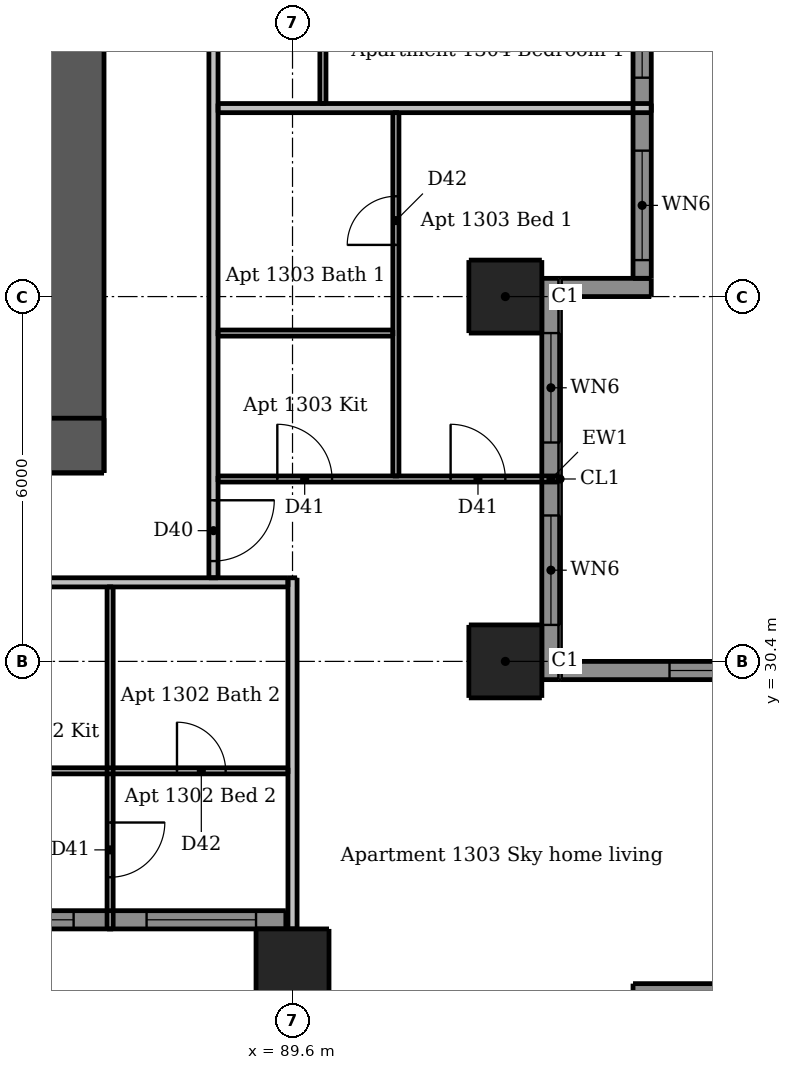
"""IFC4 building model, lengths in metres.
Left out: names, types, materials, properties, quantities, classifications, styles, units other than length and angle.
Written with IfcOpenShell. Run it as: python <this file> out.ifc"""

import sys

from ifc_helpers import new_model, si_unit, direction, frame, frame_2d, origin, origin_2d, place, context, subcontext, project, spatial, rectangle, extrude, element, fill, save


model = new_model("IFC4")
c1 = context("Model", 3, precision=1e-05, world=origin(), true_north=direction((0.0, 1.0)))
c2 = subcontext(c1, "Body", "Model", "MODEL_VIEW")
j1 = project(units=[si_unit("LENGTHUNIT", "METRE"), si_unit("PLANEANGLEUNIT", "RADIAN")], contexts=[c1])
p1 = place(None, origin())
s1 = spatial("IfcSite", under=j1, at=p1, CompositionType="ELEMENT")
p2 = place(p1, origin())
s2 = spatial("IfcBuilding", under=s1, at=p2, CompositionType="ELEMENT")
p3 = place(p2, frame((0.0, 0.0, 49.9)))
s3 = spatial("IfcBuildingStorey", under=s2, at=p3, CompositionType="ELEMENT", Elevation=49.9)
p4 = place(p3, frame((62.5, 33.95, 0.0), z_axis=(0.0, 0.0, 1.0), x_axis=(1.0, 0.0, 0.0)))
e1 = element("IfcWall", 1, at=p4, inside=s3, PredefinedType="SHEAR", context=c2, shape_type="SweptSolid", body=[
    extrude(rectangle(XDim=24.0, YDim=0.9, at=frame_2d((12.0, 0.0))), origin(), (0.0, 0.0, 1.0), 3.05),
])
p5 = place(p4, frame((2.05, 0.0, 0.0)))
e2 = element("IfcOpeningElement", 2, at=p5, cuts=e1, PredefinedType="OPENING", context=c2, shape_type="SweptSolid", body=[
    extrude(rectangle(XDim=1.1, YDim=2.1, at=frame_2d((0.55, 1.05))), frame((0.0, 0.46, 0.0), z_axis=(0.0, -1.0, 0.0), x_axis=(1.0, 0.0, 0.0)), (0.0, 0.0, 1.0), 0.92),
])
p6 = place(p4, frame((20.85, 0.0, 0.0)))
e3 = element("IfcOpeningElement", 3, at=p6, cuts=e1, PredefinedType="OPENING", context=c2, shape_type="SweptSolid", body=[
    extrude(rectangle(XDim=1.1, YDim=2.1, at=frame_2d((0.55, 1.05))), frame((0.0, 0.46, 0.0), z_axis=(0.0, -1.0, 0.0), x_axis=(1.0, 0.0, 0.0)), (0.0, 0.0, 1.0), 0.92),
])
p7 = place(p4, frame((8.0, 0.0, 0.0)))
e4 = element("IfcOpeningElement", 4, at=p7, cuts=e1, PredefinedType="OPENING", context=c2, shape_type="SweptSolid", body=[
    extrude(rectangle(XDim=1.1, YDim=2.1, at=frame_2d((0.55, 1.05))), frame((0.0, 0.46, 0.0), z_axis=(0.0, -1.0, 0.0), x_axis=(1.0, 0.0, 0.0)), (0.0, 0.0, 1.0), 0.92),
])
p8 = place(p4, frame((17.488, 0.0, 0.0)))
e5 = element("IfcOpeningElement", 5, at=p8, cuts=e1, PredefinedType="OPENING", context=c2, shape_type="SweptSolid", body=[
    extrude(rectangle(XDim=0.9, YDim=2.1, at=frame_2d((0.45, 1.05))), frame((0.0, 0.46, 0.0), z_axis=(0.0, -1.0, 0.0), x_axis=(1.0, 0.0, 0.0)), (0.0, 0.0, 1.0), 0.92),
])
p9 = place(p3, frame((86.05, 33.5, 0.0), z_axis=(0.0, 0.0, 1.0), x_axis=(0.0, 1.0, 0.0)))
e6 = element("IfcWall", 6, at=p9, inside=s3, PredefinedType="SHEAR", context=c2, shape_type="SweptSolid", body=[
    extrude(rectangle(XDim=24.0, YDim=0.9, at=frame_2d((12.0, 0.0))), origin(), (0.0, 0.0, 1.0), 3.05),
])
p10 = place(p9, frame((11.2, 0.0, 0.0)))
e7 = element("IfcOpeningElement", 7, at=p10, cuts=e6, PredefinedType="OPENING", context=c2, shape_type="SweptSolid", body=[
    extrude(rectangle(XDim=1.6, YDim=2.1, at=frame_2d((0.8, 1.05))), frame((0.0, 0.46, 0.0), z_axis=(0.0, -1.0, 0.0), x_axis=(1.0, 0.0, 0.0)), (0.0, 0.0, 1.0), 0.92),
])
for number, where, z_axis, x_axis in (
    (8, (89.6, 25.4, 0.0), (0.0, 0.0, 1.0), (1.0, 0.0, 0.0)),
    (9, (93.1, 30.4, 0.0), (0.0, 0.0, 1.0), (1.0, 0.0, 0.0)),
    (10, (93.1, 36.4, 0.0), (0.0, 0.0, 1.0), (1.0, 0.0, 0.0)),
):
    element("IfcColumn", number, at=place(p3, frame(where, z_axis=z_axis, x_axis=x_axis)), inside=s3, PredefinedType="COLUMN", context=c2, shape_type="SweptSolid", body=[
        extrude(rectangle(XDim=1.2, YDim=1.2, at=origin_2d()), origin(), (0.0, 0.0, 1.0), 3.05),
    ])
p11 = place(p3, frame((95.2, 24.95, 0.0), z_axis=(0.0, 0.0, 1.0), x_axis=(1.0, 0.0, 0.0)))
e11 = element("IfcWall", 11, at=p11, inside=s3, PredefinedType="SOLIDWALL", context=c2, shape_type="SweptSolid", body=[
    extrude(rectangle(XDim=4.8, YDim=0.3, at=frame_2d((2.4, 0.0))), origin(), (0.0, 0.0, 1.0), 3.05),
])
p12 = place(p3, frame((100.0, 30.25, 0.0), z_axis=(0.0, 0.0, 1.0), x_axis=(-1.0, 0.0, 0.0)))
e12 = element("IfcWall", 12, at=p12, inside=s3, PredefinedType="SOLIDWALL", context=c2, shape_type="SweptSolid", body=[
    extrude(rectangle(XDim=6.0, YDim=0.3, at=frame_2d((3.0, 0.0))), origin(), (0.0, 0.0, 1.0), 3.05),
])
p13 = place(p12, frame((1.8, 0.0, 0.15)))
e13 = element("IfcOpeningElement", 13, at=p13, cuts=e12, PredefinedType="OPENING", context=c2, shape_type="SweptSolid", body=[
    extrude(rectangle(XDim=2.4, YDim=2.1, at=frame_2d((1.2, 1.05))), frame((0.0, 0.16, 0.0), z_axis=(0.0, -1.0, 0.0), x_axis=(1.0, 0.0, 0.0)), (0.0, 0.0, 1.0), 0.32),
])
p14 = place(p3, frame((94.0, 36.55, 0.0), z_axis=(0.0, 0.0, 1.0), x_axis=(1.0, 0.0, 0.0)))
e14 = element("IfcWall", 14, at=p14, inside=s3, PredefinedType="SOLIDWALL", context=c2, shape_type="SweptSolid", body=[
    extrude(rectangle(XDim=1.5, YDim=0.3, at=frame_2d((0.75, 0.0))), origin(), (0.0, 0.0, 1.0), 3.05),
])
p15 = place(p3, frame((83.6, 26.15, 0.0), z_axis=(0.0, 0.0, 1.0), x_axis=(1.0, 0.0, 0.0)))
e15 = element("IfcWall", 15, at=p15, inside=s3, PredefinedType="SOLIDWALL", context=c2, shape_type="SweptSolid", body=[
    extrude(rectangle(XDim=5.89, YDim=0.3, at=frame_2d((2.945, 0.0))), origin(), (0.0, 0.0, 1.0), 3.05),
])
p16 = place(p15, frame((0.6, 0.0, 0.15)))
e16 = element("IfcOpeningElement", 16, at=p16, cuts=e15, PredefinedType="OPENING", context=c2, shape_type="SweptSolid", body=[
    extrude(rectangle(XDim=1.8, YDim=2.1, at=frame_2d((0.9, 1.05))), frame((0.0, 0.16, 0.0), z_axis=(0.0, -1.0, 0.0), x_axis=(1.0, 0.0, 0.0)), (0.0, 0.0, 1.0), 0.32),
])
p17 = place(p15, frame((3.6, 0.0, 0.15)))
e17 = element("IfcOpeningElement", 17, at=p17, cuts=e15, PredefinedType="OPENING", context=c2, shape_type="SweptSolid", body=[
    extrude(rectangle(XDim=1.8, YDim=2.1, at=frame_2d((0.9, 1.05))), frame((0.0, 0.16, 0.0), z_axis=(0.0, -1.0, 0.0), x_axis=(1.0, 0.0, 0.0)), (0.0, 0.0, 1.0), 0.32),
])
p18 = place(p3, frame((93.85, 30.1, 0.0), z_axis=(0.0, 0.0, 1.0), x_axis=(0.0, 1.0, 0.0)))
e18 = element("IfcWall", 18, at=p18, inside=s3, PredefinedType="SOLIDWALL", context=c2, shape_type="SweptSolid", body=[
    extrude(rectangle(XDim=6.6, YDim=0.3, at=frame_2d((3.3, 0.0))), origin(), (0.0, 0.0, 1.0), 3.05),
])
p19 = place(p18, frame((0.9, 0.0, 0.15)))
e19 = element("IfcOpeningElement", 19, at=p19, cuts=e18, PredefinedType="OPENING", context=c2, shape_type="SweptSolid", body=[
    extrude(rectangle(XDim=1.8, YDim=2.1, at=frame_2d((0.9, 1.05))), frame((0.0, 0.16, 0.0), z_axis=(0.0, -1.0, 0.0), x_axis=(1.0, 0.0, 0.0)), (0.0, 0.0, 1.0), 0.32),
])
p20 = place(p18, frame((3.9, 0.0, 0.15)))
e20 = element("IfcOpeningElement", 20, at=p20, cuts=e18, PredefinedType="OPENING", context=c2, shape_type="SweptSolid", body=[
    extrude(rectangle(XDim=1.8, YDim=2.1, at=frame_2d((0.9, 1.05))), frame((0.0, 0.16, 0.0), z_axis=(0.0, -1.0, 0.0), x_axis=(1.0, 0.0, 0.0)), (0.0, 0.0, 1.0), 0.32),
])
p21 = place(p3, frame((95.35, 36.7, 0.0), z_axis=(0.0, 0.0, 1.0), x_axis=(0.0, 1.0, 0.0)))
e21 = element("IfcWall", 21, at=p21, inside=s3, PredefinedType="SOLIDWALL", context=c2, shape_type="SweptSolid", body=[
    extrude(rectangle(XDim=5.61, YDim=0.3, at=frame_2d((2.805, 0.0))), origin(), (0.0, 0.0, 1.0), 3.05),
])
p22 = place(p21, frame((0.3, 0.0, 0.15)))
e22 = element("IfcOpeningElement", 22, at=p22, cuts=e21, PredefinedType="OPENING", context=c2, shape_type="SweptSolid", body=[
    extrude(rectangle(XDim=1.8, YDim=2.1, at=frame_2d((0.9, 1.05))), frame((0.0, 0.16, 0.0), z_axis=(0.0, -1.0, 0.0), x_axis=(1.0, 0.0, 0.0)), (0.0, 0.0, 1.0), 0.32),
])
p23 = place(p21, frame((3.3, 0.0, 0.15)))
e23 = element("IfcOpeningElement", 23, at=p23, cuts=e21, PredefinedType="OPENING", context=c2, shape_type="SweptSolid", body=[
    extrude(rectangle(XDim=1.8, YDim=2.1, at=frame_2d((0.9, 1.05))), frame((0.0, 0.16, 0.0), z_axis=(0.0, -1.0, 0.0), x_axis=(1.0, 0.0, 0.0)), (0.0, 0.0, 1.0), 0.32),
])
p24 = place(p3, frame((86.6, 31.625, 0.0), z_axis=(0.0, 0.0, 1.0), x_axis=(0.0, -1.0, 0.0)))
e24 = element("IfcWall", 24, at=p24, inside=s3, PredefinedType="PARTITIONING", context=c2, shape_type="SweptSolid", body=[
    extrude(rectangle(XDim=5.625, YDim=0.1, at=frame_2d((2.812, 0.0))), origin(), (0.0, 0.0, 1.0), 3.05),
])
p25 = place(p24, frame((3.875, 0.0, 0.0)))
e25 = element("IfcOpeningElement", 25, at=p25, cuts=e24, PredefinedType="OPENING", context=c2, shape_type="SweptSolid", body=[
    extrude(rectangle(XDim=0.9, YDim=2.1, at=frame_2d((0.45, 1.05))), frame((0.0, 0.06, 0.0), z_axis=(0.0, -1.0, 0.0), x_axis=(1.0, 0.0, 0.0)), (0.0, 0.0, 1.0), 0.12),
])
p26 = place(p3, frame((90.1, 59.35, 0.0), z_axis=(0.0, 0.0, 1.0), x_axis=(0.0, -1.0, 0.0)))
e26 = element("IfcWall", 26, at=p26, inside=s3, PredefinedType="PARTITIONING", context=c2, shape_type="SweptSolid", body=[
    extrude(rectangle(XDim=19.775, YDim=0.1, at=frame_2d((9.888, 0.0))), origin(), (0.0, 0.0, 1.0), 3.05),
])
p27 = place(p26, frame((4.45, 0.0, 0.0)))
e27 = element("IfcOpeningElement", 27, at=p27, cuts=e26, PredefinedType="OPENING", context=c2, shape_type="SweptSolid", body=[
    extrude(rectangle(XDim=0.9, YDim=2.1, at=frame_2d((0.45, 1.05))), frame((0.0, 0.06, 0.0), z_axis=(0.0, -1.0, 0.0), x_axis=(1.0, 0.0, 0.0)), (0.0, 0.0, 1.0), 0.12),
])
p28 = place(p26, frame((0.55, 0.0, 0.0)))
e28 = element("IfcOpeningElement", 28, at=p28, cuts=e26, PredefinedType="OPENING", context=c2, shape_type="SweptSolid", body=[
    extrude(rectangle(XDim=0.9, YDim=2.1, at=frame_2d((0.45, 1.05))), frame((0.0, 0.06, 0.0), z_axis=(0.0, -1.0, 0.0), x_axis=(1.0, 0.0, 0.0)), (0.0, 0.0, 1.0), 0.12),
])
p29 = place(p26, frame((17.6, 0.0, 0.0)))
e29 = element("IfcOpeningElement", 29, at=p29, cuts=e26, PredefinedType="OPENING", context=c2, shape_type="SweptSolid", body=[
    extrude(rectangle(XDim=0.9, YDim=2.1, at=frame_2d((0.45, 1.05))), frame((0.0, 0.06, 0.0), z_axis=(0.0, -1.0, 0.0), x_axis=(1.0, 0.0, 0.0)), (0.0, 0.0, 1.0), 0.12),
])
p30 = place(p26, frame((11.6, 0.0, 0.0)))
e30 = element("IfcOpeningElement", 30, at=p30, cuts=e26, PredefinedType="OPENING", context=c2, shape_type="SweptSolid", body=[
    extrude(rectangle(XDim=0.9, YDim=2.1, at=frame_2d((0.45, 1.05))), frame((0.0, 0.06, 0.0), z_axis=(0.0, -1.0, 0.0), x_axis=(1.0, 0.0, 0.0)), (0.0, 0.0, 1.0), 0.12),
])
p31 = place(p26, frame((14.65, 0.0, 0.0)))
e31 = element("IfcOpeningElement", 31, at=p31, cuts=e26, PredefinedType="OPENING", context=c2, shape_type="SweptSolid", body=[
    extrude(rectangle(XDim=0.8, YDim=2.1, at=frame_2d((0.4, 1.05))), frame((0.0, 0.06, 0.0), z_axis=(0.0, -1.0, 0.0), x_axis=(1.0, 0.0, 0.0)), (0.0, 0.0, 1.0), 0.12),
])
p32 = place(p26, frame((8.65, 0.0, 0.0)))
e32 = element("IfcOpeningElement", 32, at=p32, cuts=e26, PredefinedType="OPENING", context=c2, shape_type="SweptSolid", body=[
    extrude(rectangle(XDim=0.8, YDim=2.1, at=frame_2d((0.4, 1.05))), frame((0.0, 0.06, 0.0), z_axis=(0.0, -1.0, 0.0), x_axis=(1.0, 0.0, 0.0)), (0.0, 0.0, 1.0), 0.12),
])
p33 = place(p3, frame((91.3, 33.45, 0.0), z_axis=(0.0, 0.0, 1.0), x_axis=(0.0, 1.0, 0.0)))
e33 = element("IfcWall", 33, at=p33, inside=s3, PredefinedType="PARTITIONING", context=c2, shape_type="SweptSolid", body=[
    extrude(rectangle(XDim=5.975, YDim=0.1, at=frame_2d((2.988, 0.0))), origin(), (0.0, 0.0, 1.0), 3.05),
])
p34 = place(p33, frame((3.8, 0.0, 0.0)))
e34 = element("IfcOpeningElement", 34, at=p34, cuts=e33, PredefinedType="OPENING", context=c2, shape_type="SweptSolid", body=[
    extrude(rectangle(XDim=0.8, YDim=2.1, at=frame_2d((0.4, 1.05))), frame((0.0, 0.06, 0.0), z_axis=(0.0, -1.0, 0.0), x_axis=(1.0, 0.0, 0.0)), (0.0, 0.0, 1.0), 0.12),
])
p35 = place(p3, frame((88.375, 35.8, 0.0), z_axis=(0.0, 0.0, 1.0), x_axis=(1.0, 0.0, 0.0)))
e35 = element("IfcWall", 35, at=p35, inside=s3, PredefinedType="PARTITIONING", context=c2, shape_type="SweptSolid", body=[
    extrude(rectangle(XDim=2.875, YDim=0.1, at=frame_2d((1.438, 0.0))), origin(), (0.0, 0.0, 1.0), 3.05),
])
p36 = place(p3, frame((88.375, 33.4, 0.0), z_axis=(0.0, 0.0, 1.0), x_axis=(1.0, 0.0, 0.0)))
e36 = element("IfcWall", 36, at=p36, inside=s3, PredefinedType="PARTITIONING", context=c2, shape_type="SweptSolid", body=[
    extrude(rectangle(XDim=5.625, YDim=0.1, at=frame_2d((2.812, 0.0))), origin(), (0.0, 0.0, 1.0), 3.05),
])
p37 = place(p36, frame((0.975, 0.0, 0.0)))
e37 = element("IfcOpeningElement", 37, at=p37, cuts=e36, PredefinedType="OPENING", context=c2, shape_type="SweptSolid", body=[
    extrude(rectangle(XDim=0.9, YDim=2.1, at=frame_2d((0.45, 1.05))), frame((0.0, 0.06, 0.0), z_axis=(0.0, -1.0, 0.0), x_axis=(1.0, 0.0, 0.0)), (0.0, 0.0, 1.0), 0.12),
])
p38 = place(p36, frame((3.825, 0.0, 0.0)))
e38 = element("IfcOpeningElement", 38, at=p38, cuts=e36, PredefinedType="OPENING", context=c2, shape_type="SweptSolid", body=[
    extrude(rectangle(XDim=0.9, YDim=2.1, at=frame_2d((0.45, 1.05))), frame((0.0, 0.06, 0.0), z_axis=(0.0, -1.0, 0.0), x_axis=(1.0, 0.0, 0.0)), (0.0, 0.0, 1.0), 0.12),
])
p39 = place(p3, frame((84.25, 28.6, 0.0), z_axis=(0.0, 0.0, 1.0), x_axis=(1.0, 0.0, 0.0)))
e39 = element("IfcWall", 39, at=p39, inside=s3, PredefinedType="PARTITIONING", context=c2, shape_type="SweptSolid", body=[
    extrude(rectangle(XDim=5.275, YDim=0.1, at=frame_2d((2.637, 0.0))), origin(), (0.0, 0.0, 1.0), 3.05),
])
p40 = place(p39, frame((3.45, 0.0, 0.0)))
e40 = element("IfcOpeningElement", 40, at=p40, cuts=e39, PredefinedType="OPENING", context=c2, shape_type="SweptSolid", body=[
    extrude(rectangle(XDim=0.8, YDim=2.1, at=frame_2d((0.4, 1.05))), frame((0.0, 0.06, 0.0), z_axis=(0.0, -1.0, 0.0), x_axis=(1.0, 0.0, 0.0)), (0.0, 0.0, 1.0), 0.12),
])
p41 = place(p3, frame((88.3, 60.475, 0.0), z_axis=(0.0, 0.0, 1.0), x_axis=(0.0, -1.0, 0.0)))
e41 = element("IfcWall", 41, at=p41, inside=s3, PredefinedType="PARTITIONING", context=c2, shape_type="SweptSolid", body=[
    extrude(rectangle(XDim=28.7, YDim=0.15, at=frame_2d((14.35, 0.0))), origin(), (0.0, 0.0, 1.0), 3.05),
])
p42 = place(p41, frame((27.425, 0.0, 0.0)))
e42 = element("IfcOpeningElement", 42, at=p42, cuts=e41, PredefinedType="OPENING", context=c2, shape_type="SweptSolid", body=[
    extrude(rectangle(XDim=1.0, YDim=2.1, at=frame_2d((0.5, 1.05))), frame((0.0, 0.085, 0.0), z_axis=(0.0, -1.0, 0.0), x_axis=(1.0, 0.0, 0.0)), (0.0, 0.0, 1.0), 0.17),
])
p43 = place(p41, frame((10.575, 0.0, 0.0)))
e43 = element("IfcOpeningElement", 43, at=p43, cuts=e41, PredefinedType="OPENING", context=c2, shape_type="SweptSolid", body=[
    extrude(rectangle(XDim=1.0, YDim=2.1, at=frame_2d((0.5, 1.05))), frame((0.0, 0.085, 0.0), z_axis=(0.0, -1.0, 0.0), x_axis=(1.0, 0.0, 0.0)), (0.0, 0.0, 1.0), 0.17),
])
p44 = place(p3, frame((89.6, 26.0, 0.0), z_axis=(0.0, 0.0, 1.0), x_axis=(0.0, 1.0, 0.0)))
e44 = element("IfcWall", 44, at=p44, inside=s3, PredefinedType="PARTITIONING", context=c2, shape_type="SweptSolid", body=[
    extrude(rectangle(XDim=5.775, YDim=0.15, at=frame_2d((2.887, 0.0))), origin(), (0.0, 0.0, 1.0), 2.516),
])
p45 = place(p3, frame((88.375, 39.5, 0.0), z_axis=(0.0, 0.0, 1.0), x_axis=(1.0, 0.0, 0.0)))
e45 = element("IfcWall", 45, at=p45, inside=s3, PredefinedType="PARTITIONING", context=c2, shape_type="SweptSolid", body=[
    extrude(rectangle(XDim=7.125, YDim=0.15, at=frame_2d((3.562, 0.0))), origin(), (0.0, 0.0, 1.0), 3.05),
])
p46 = place(p3, frame((89.525, 31.7, 0.0), z_axis=(0.0, 0.0, 1.0), x_axis=(-1.0, 0.0, 0.0)))
e46 = element("IfcWall", 46, at=p46, inside=s3, PredefinedType="PARTITIONING", context=c2, shape_type="SweptSolid", body=[
    extrude(rectangle(XDim=28.75, YDim=0.15, at=frame_2d((14.375, 0.0))), origin(), (0.0, 0.0, 1.0), 3.05),
])
p47 = place(p46, frame((24.325, 0.0, 0.0)))
e47 = element("IfcOpeningElement", 47, at=p47, cuts=e46, PredefinedType="OPENING", context=c2, shape_type="SweptSolid", body=[
    extrude(rectangle(XDim=1.0, YDim=2.1, at=frame_2d((0.5, 1.05))), frame((0.0, 0.085, 0.0), z_axis=(0.0, -1.0, 0.0), x_axis=(1.0, 0.0, 0.0)), (0.0, 0.0, 1.0), 0.17),
])
p48 = place(p46, frame((6.575, 0.0, 0.0)))
e48 = element("IfcOpeningElement", 48, at=p48, cuts=e46, PredefinedType="OPENING", context=c2, shape_type="SweptSolid", body=[
    extrude(rectangle(XDim=1.0, YDim=2.1, at=frame_2d((0.5, 1.05))), frame((0.0, 0.085, 0.0), z_axis=(0.0, -1.0, 0.0), x_axis=(1.0, 0.0, 0.0)), (0.0, 0.0, 1.0), 0.17),
])
p49 = place(p13, origin())
e49 = element("IfcWindow", 49, at=p49, inside=s3, PartitioningType="DOUBLE_PANEL_VERTICAL", PredefinedType="WINDOW", context=c2, shape_type="SweptSolid", body=[
    extrude(rectangle(XDim=2.4, YDim=2.1, at=frame_2d((1.2, 1.05))), frame((0.0, 0.03, 0.0), z_axis=(0.0, -1.0, 0.0), x_axis=(1.0, 0.0, 0.0)), (0.0, 0.0, 1.0), 0.06),
])
fill(e13, e49)
p50 = place(p16, origin())
e50 = element("IfcWindow", 50, at=p50, inside=s3, PartitioningType="DOUBLE_PANEL_VERTICAL", PredefinedType="WINDOW", context=c2, shape_type="SweptSolid", body=[
    extrude(rectangle(XDim=1.8, YDim=2.1, at=frame_2d((0.9, 1.05))), frame((0.0, 0.03, 0.0), z_axis=(0.0, -1.0, 0.0), x_axis=(1.0, 0.0, 0.0)), (0.0, 0.0, 1.0), 0.06),
])
fill(e16, e50)
p51 = place(p17, origin())
e51 = element("IfcWindow", 51, at=p51, inside=s3, PartitioningType="DOUBLE_PANEL_VERTICAL", PredefinedType="WINDOW", context=c2, shape_type="SweptSolid", body=[
    extrude(rectangle(XDim=1.8, YDim=2.1, at=frame_2d((0.9, 1.05))), frame((0.0, 0.03, 0.0), z_axis=(0.0, -1.0, 0.0), x_axis=(1.0, 0.0, 0.0)), (0.0, 0.0, 1.0), 0.06),
])
fill(e17, e51)
p52 = place(p19, origin())
e52 = element("IfcWindow", 52, at=p52, inside=s3, PartitioningType="DOUBLE_PANEL_VERTICAL", PredefinedType="WINDOW", context=c2, shape_type="SweptSolid", body=[
    extrude(rectangle(XDim=1.8, YDim=2.1, at=frame_2d((0.9, 1.05))), frame((0.0, 0.03, 0.0), z_axis=(0.0, -1.0, 0.0), x_axis=(1.0, 0.0, 0.0)), (0.0, 0.0, 1.0), 0.06),
])
fill(e19, e52)
p53 = place(p20, origin())
e53 = element("IfcWindow", 53, at=p53, inside=s3, PartitioningType="DOUBLE_PANEL_VERTICAL", PredefinedType="WINDOW", context=c2, shape_type="SweptSolid", body=[
    extrude(rectangle(XDim=1.8, YDim=2.1, at=frame_2d((0.9, 1.05))), frame((0.0, 0.03, 0.0), z_axis=(0.0, -1.0, 0.0), x_axis=(1.0, 0.0, 0.0)), (0.0, 0.0, 1.0), 0.06),
])
fill(e20, e53)
p54 = place(p22, origin())
e54 = element("IfcWindow", 54, at=p54, inside=s3, PartitioningType="DOUBLE_PANEL_VERTICAL", PredefinedType="WINDOW", context=c2, shape_type="SweptSolid", body=[
    extrude(rectangle(XDim=1.8, YDim=2.1, at=frame_2d((0.9, 1.05))), frame((0.0, 0.03, 0.0), z_axis=(0.0, -1.0, 0.0), x_axis=(1.0, 0.0, 0.0)), (0.0, 0.0, 1.0), 0.06),
])
fill(e22, e54)
p55 = place(p23, origin())
e55 = element("IfcWindow", 55, at=p55, inside=s3, PartitioningType="DOUBLE_PANEL_VERTICAL", PredefinedType="WINDOW", context=c2, shape_type="SweptSolid", body=[
    extrude(rectangle(XDim=1.8, YDim=2.1, at=frame_2d((0.9, 1.05))), frame((0.0, 0.03, 0.0), z_axis=(0.0, -1.0, 0.0), x_axis=(1.0, 0.0, 0.0)), (0.0, 0.0, 1.0), 0.06),
])
fill(e23, e55)
p56 = place(p25, origin())
e56 = element("IfcDoor", 56, at=p56, inside=s3, OperationType="SINGLE_SWING_LEFT", PredefinedType="DOOR", context=c2, shape_type="SweptSolid", body=[
    extrude(rectangle(XDim=0.9, YDim=2.1, at=frame_2d((0.45, 1.05))), frame((0.0, 0.025, 0.0), z_axis=(0.0, -1.0, 0.0), x_axis=(1.0, 0.0, 0.0)), (0.0, 0.0, 1.0), 0.05),
])
fill(e25, e56)
p57 = place(p40, origin())
e57 = element("IfcDoor", 57, at=p57, inside=s3, OperationType="SINGLE_SWING_LEFT", PredefinedType="DOOR", context=c2, shape_type="SweptSolid", body=[
    extrude(rectangle(XDim=0.8, YDim=2.1, at=frame_2d((0.4, 1.05))), frame((0.0, 0.025, 0.0), z_axis=(0.0, -1.0, 0.0), x_axis=(1.0, 0.0, 0.0)), (0.0, 0.0, 1.0), 0.05),
])
fill(e40, e57)
p58 = place(p42, origin())
e58 = element("IfcDoor", 58, at=p58, inside=s3, OperationType="SINGLE_SWING_LEFT", PredefinedType="DOOR", context=c2, shape_type="SweptSolid", body=[
    extrude(rectangle(XDim=1.0, YDim=2.1, at=frame_2d((0.5, 1.05))), frame((0.0, 0.025, 0.0), z_axis=(0.0, -1.0, 0.0), x_axis=(1.0, 0.0, 0.0)), (0.0, 0.0, 1.0), 0.05),
])
fill(e42, e58)
p59 = place(p37, origin())
e59 = element("IfcDoor", 59, at=p59, inside=s3, OperationType="SINGLE_SWING_LEFT", PredefinedType="DOOR", context=c2, shape_type="SweptSolid", body=[
    extrude(rectangle(XDim=0.9, YDim=2.1, at=frame_2d((0.45, 1.05))), frame((0.0, 0.025, 0.0), z_axis=(0.0, -1.0, 0.0), x_axis=(1.0, 0.0, 0.0)), (0.0, 0.0, 1.0), 0.05),
])
fill(e37, e59)
p60 = place(p38, origin())
e60 = element("IfcDoor", 60, at=p60, inside=s3, OperationType="SINGLE_SWING_LEFT", PredefinedType="DOOR", context=c2, shape_type="SweptSolid", body=[
    extrude(rectangle(XDim=0.9, YDim=2.1, at=frame_2d((0.45, 1.05))), frame((0.0, 0.025, 0.0), z_axis=(0.0, -1.0, 0.0), x_axis=(1.0, 0.0, 0.0)), (0.0, 0.0, 1.0), 0.05),
])
fill(e38, e60)
p61 = place(p34, origin())
e61 = element("IfcDoor", 61, at=p61, inside=s3, OperationType="SINGLE_SWING_LEFT", PredefinedType="DOOR", context=c2, shape_type="SweptSolid", body=[
    extrude(rectangle(XDim=0.8, YDim=2.1, at=frame_2d((0.4, 1.05))), frame((0.0, 0.025, 0.0), z_axis=(0.0, -1.0, 0.0), x_axis=(1.0, 0.0, 0.0)), (0.0, 0.0, 1.0), 0.05),
])
fill(e34, e61)
save(model, sys.argv[1])
